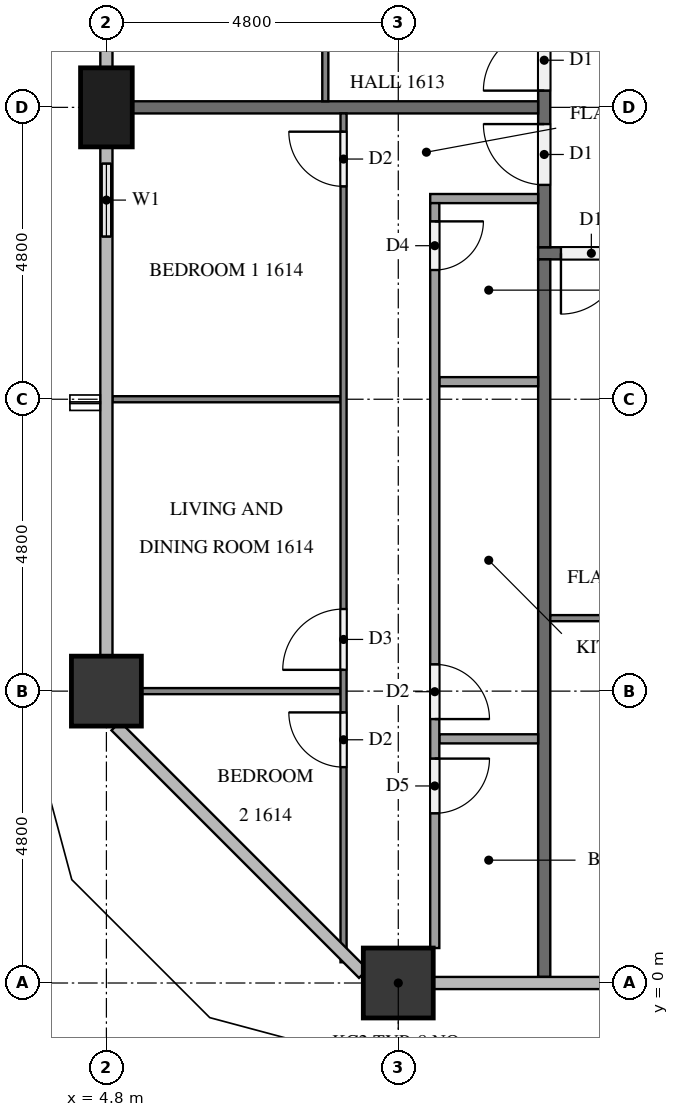
"""IFC4 building model, lengths in metres.
Left out: names, types, materials, properties, quantities, classifications, styles, units other than length and angle.
Written with IfcOpenShell. Run it as: python <this file> out.ifc"""

import sys

from ifc_helpers import new_model, si_unit, direction, frame, frame_2d, origin, origin_2d, place, context, subcontext, project, spatial, rectangle, extrude, element, fill, save


model = new_model("IFC4")
c1 = context("Model", 3, precision=1e-05, world=origin(), true_north=direction((0.0, 1.0)))
c2 = subcontext(c1, "Body", "Model", "MODEL_VIEW")
j1 = project(units=[si_unit("LENGTHUNIT", "METRE"), si_unit("PLANEANGLEUNIT", "RADIAN")], contexts=[c1])
p1 = place(None, origin())
s1 = spatial("IfcSite", under=j1, at=p1, CompositionType="ELEMENT")
p2 = place(p1, origin())
s2 = spatial("IfcBuilding", under=s1, at=p2, CompositionType="ELEMENT")
p3 = place(p2, frame((0.0, 0.0, 66.3)))
s3 = spatial("IfcBuildingStorey", under=s2, at=p3, CompositionType="ELEMENT", Elevation=66.3)
p4 = place(p3, frame((9.6, 0.0, 0.0), z_axis=(0.0, 0.0, 1.0), x_axis=(1.0, 0.0, 0.0)))
e1 = element("IfcColumn", 1, at=p4, inside=s3, PredefinedType="COLUMN", context=c2, shape_type="SweptSolid", body=[
    extrude(rectangle(XDim=1.15, YDim=1.15, at=origin_2d()), origin(), (0.0, 0.0, 1.0), 3.2),
])
p5 = place(p3, frame((4.8, 14.4, 0.0), z_axis=(0.0, 0.0, 1.0), x_axis=(0.0, 1.0, 0.0)))
e2 = element("IfcColumn", 2, at=p5, inside=s3, PredefinedType="COLUMN", context=c2, shape_type="SweptSolid", body=[
    extrude(rectangle(XDim=1.3, YDim=0.85, at=origin_2d()), origin(), (0.0, 0.0, 1.0), 3.2),
])
p6 = place(p3, frame((4.8, 4.8, 0.0), z_axis=(0.0, 0.0, 1.0), x_axis=(1.0, 0.0, 0.0)))
e3 = element("IfcColumn", 3, at=p6, inside=s3, PredefinedType="COLUMN", context=c2, shape_type="SweptSolid", body=[
    extrude(rectangle(XDim=1.15, YDim=1.15, at=origin_2d()), origin(), (0.0, 0.0, 1.0), 3.2),
])
p7 = place(p3, frame((4.8, 13.75, 0.0), z_axis=(0.0, 0.0, 1.0), x_axis=(0.0, -1.0, 0.0)))
e4 = element("IfcWall", 4, at=p7, inside=s3, PredefinedType="SOLIDWALL", context=c2, shape_type="SweptSolid", body=[
    extrude(rectangle(XDim=1.75, YDim=0.15, at=frame_2d((0.875, 0.0))), origin(), (0.0, 0.0, 1.0), 3.2),
])
p8 = place(p7, frame((0.275, 0.0, 0.9)))
e5 = element("IfcOpeningElement", 5, at=p8, cuts=e4, PredefinedType="OPENING", context=c2, shape_type="SweptSolid", body=[
    extrude(rectangle(XDim=1.2, YDim=1.4, at=frame_2d((0.6, 0.7))), frame((0.0, 0.085, 0.0), z_axis=(0.0, -1.0, 0.0), x_axis=(1.0, 0.0, 0.0)), (0.0, 0.0, 1.0), 0.17),
])
p9 = place(p3, frame((50.5, 12.0, 0.0), z_axis=(0.0, 0.0, 1.0), x_axis=(-1.0, 0.0, 0.0)))
e6 = element("IfcWall", 6, at=p9, inside=s3, PredefinedType="PARTITIONING", context=c2, shape_type="SweptSolid", body=[
    extrude(rectangle(XDim=38.6, YDim=0.2, at=frame_2d((19.3, 0.0))), origin(), (0.0, 0.0, 1.0), 3.2),
])
p10 = place(p9, frame((37.225, 0.0, 0.0)))
e7 = element("IfcOpeningElement", 7, at=p10, cuts=e6, PredefinedType="OPENING", context=c2, shape_type="SweptSolid", body=[
    extrude(rectangle(XDim=1.0, YDim=2.1, at=frame_2d((0.5, 1.05))), frame((0.0, 0.11, 0.0), z_axis=(0.0, -1.0, 0.0), x_axis=(1.0, 0.0, 0.0)), (0.0, 0.0, 1.0), 0.22),
])
p11 = place(p9, frame((22.825, 0.0, 0.0)))
e8 = element("IfcOpeningElement", 8, at=p11, cuts=e6, PredefinedType="OPENING", context=c2, shape_type="SweptSolid", body=[
    extrude(rectangle(XDim=1.0, YDim=2.1, at=frame_2d((0.5, 1.05))), frame((0.0, 0.11, 0.0), z_axis=(0.0, -1.0, 0.0), x_axis=(1.0, 0.0, 0.0)), (0.0, 0.0, 1.0), 0.22),
])
p12 = place(p9, frame((0.375, 0.0, 0.0)))
e9 = element("IfcOpeningElement", 9, at=p12, cuts=e6, PredefinedType="OPENING", context=c2, shape_type="SweptSolid", body=[
    extrude(rectangle(XDim=1.0, YDim=2.1, at=frame_2d((0.5, 1.05))), frame((0.0, 0.11, 0.0), z_axis=(0.0, -1.0, 0.0), x_axis=(1.0, 0.0, 0.0)), (0.0, 0.0, 1.0), 0.22),
])
p13 = place(p3, frame((12.0, 12.1, 0.0), z_axis=(0.0, 0.0, 1.0), x_axis=(0.0, 1.0, 0.0)))
e10 = element("IfcWall", 10, at=p13, inside=s3, PredefinedType="PARTITIONING", context=c2, shape_type="SweptSolid", body=[
    extrude(rectangle(XDim=28.6, YDim=0.2, at=frame_2d((14.3, 0.0))), origin(), (0.0, 0.0, 1.0), 3.2),
])
p14 = place(p13, frame((19.375, 0.0, 0.0)))
e11 = element("IfcOpeningElement", 11, at=p14, cuts=e10, PredefinedType="OPENING", context=c2, shape_type="SweptSolid", body=[
    extrude(rectangle(XDim=1.0, YDim=2.1, at=frame_2d((0.5, 1.05))), frame((0.0, 0.11, 0.0), z_axis=(0.0, -1.0, 0.0), x_axis=(1.0, 0.0, 0.0)), (0.0, 0.0, 1.0), 0.22),
])
p15 = place(p13, frame((12.175, 0.0, 0.0)))
e12 = element("IfcOpeningElement", 12, at=p15, cuts=e10, PredefinedType="OPENING", context=c2, shape_type="SweptSolid", body=[
    extrude(rectangle(XDim=1.0, YDim=2.1, at=frame_2d((0.5, 1.05))), frame((0.0, 0.11, 0.0), z_axis=(0.0, -1.0, 0.0), x_axis=(1.0, 0.0, 0.0)), (0.0, 0.0, 1.0), 0.22),
])
p16 = place(p13, frame((2.575, 0.0, 0.0)))
e13 = element("IfcOpeningElement", 13, at=p16, cuts=e10, PredefinedType="OPENING", context=c2, shape_type="SweptSolid", body=[
    extrude(rectangle(XDim=1.0, YDim=2.1, at=frame_2d((0.5, 1.05))), frame((0.0, 0.11, 0.0), z_axis=(0.0, -1.0, 0.0), x_axis=(1.0, 0.0, 0.0)), (0.0, 0.0, 1.0), 0.22),
])
p17 = place(p13, frame((1.025, 0.0, 0.0)))
e14 = element("IfcOpeningElement", 14, at=p17, cuts=e10, PredefinedType="OPENING", context=c2, shape_type="SweptSolid", body=[
    extrude(rectangle(XDim=1.0, YDim=2.1, at=frame_2d((0.5, 1.05))), frame((0.0, 0.11, 0.0), z_axis=(0.0, -1.0, 0.0), x_axis=(1.0, 0.0, 0.0)), (0.0, 0.0, 1.0), 0.22),
])
p18 = place(p3, frame((12.0, 0.1, 0.0), z_axis=(0.0, 0.0, 1.0), x_axis=(0.0, 1.0, 0.0)))
e15 = element("IfcWall", 15, at=p18, inside=s3, PredefinedType="PARTITIONING", context=c2, shape_type="SweptSolid", body=[
    extrude(rectangle(XDim=11.8, YDim=0.2, at=frame_2d((5.9, 0.0))), origin(), (0.0, 0.0, 1.0), 3.2),
])
p19 = place(p3, frame((5.225, 14.4, 0.0), z_axis=(0.0, 0.0, 1.0), x_axis=(1.0, 0.0, 0.0)))
e16 = element("IfcWall", 16, at=p19, inside=s3, PredefinedType="PARTITIONING", context=c2, shape_type="SweptSolid", body=[
    extrude(rectangle(XDim=6.675, YDim=0.2, at=frame_2d((3.337, 0.0))), origin(), (0.0, 0.0, 1.0), 3.2),
])
p20 = place(p3, frame((26.3, 6.0, 0.0), z_axis=(0.0, 0.0, 1.0), x_axis=(-1.0, 0.0, 0.0)))
e17 = element("IfcWall", 17, at=p20, inside=s3, PredefinedType="PARTITIONING", context=c2, shape_type="SweptSolid", body=[
    extrude(rectangle(XDim=14.2, YDim=0.1, at=frame_2d((7.1, 0.0))), origin(), (0.0, 0.0, 1.0), 3.2),
])
p21 = place(p20, frame((9.85, 0.0, 0.0)))
e18 = element("IfcOpeningElement", 18, at=p21, cuts=e17, PredefinedType="OPENING", context=c2, shape_type="SweptSolid", body=[
    extrude(rectangle(XDim=0.9, YDim=2.1, at=frame_2d((0.45, 1.05))), frame((0.0, 0.06, 0.0), z_axis=(0.0, -1.0, 0.0), x_axis=(1.0, 0.0, 0.0)), (0.0, 0.0, 1.0), 0.12),
])
p22 = place(p20, frame((8.15, 0.0, 0.0)))
e19 = element("IfcOpeningElement", 19, at=p22, cuts=e17, PredefinedType="OPENING", context=c2, shape_type="SweptSolid", body=[
    extrude(rectangle(XDim=1.0, YDim=2.1, at=frame_2d((0.5, 1.05))), frame((0.0, 0.06, 0.0), z_axis=(0.0, -1.0, 0.0), x_axis=(1.0, 0.0, 0.0)), (0.0, 0.0, 1.0), 0.12),
])
p23 = place(p20, frame((0.3, 0.0, 0.0)))
e20 = element("IfcOpeningElement", 20, at=p23, cuts=e17, PredefinedType="OPENING", context=c2, shape_type="SweptSolid", body=[
    extrude(rectangle(XDim=0.9, YDim=2.1, at=frame_2d((0.45, 1.05))), frame((0.0, 0.06, 0.0), z_axis=(0.0, -1.0, 0.0), x_axis=(1.0, 0.0, 0.0)), (0.0, 0.0, 1.0), 0.12),
])
p24 = place(p3, frame((8.4, 14.5, 0.0), z_axis=(0.0, 0.0, 1.0), x_axis=(0.0, 1.0, 0.0)))
e21 = element("IfcWall", 21, at=p24, inside=s3, PredefinedType="PARTITIONING", context=c2, shape_type="SweptSolid", body=[
    extrude(rectangle(XDim=9.4, YDim=0.1, at=frame_2d((4.7, 0.0))), origin(), (0.0, 0.0, 1.0), 3.2),
])
p25 = place(p24, frame((3.35, 0.0, 0.0)))
e22 = element("IfcOpeningElement", 22, at=p25, cuts=e21, PredefinedType="OPENING", context=c2, shape_type="SweptSolid", body=[
    extrude(rectangle(XDim=1.0, YDim=2.1, at=frame_2d((0.5, 1.05))), frame((0.0, 0.06, 0.0), z_axis=(0.0, -1.0, 0.0), x_axis=(1.0, 0.0, 0.0)), (0.0, 0.0, 1.0), 0.12),
])
p26 = place(p24, frame((5.05, 0.0, 0.0)))
e23 = element("IfcOpeningElement", 23, at=p26, cuts=e21, PredefinedType="OPENING", context=c2, shape_type="SweptSolid", body=[
    extrude(rectangle(XDim=0.9, YDim=2.1, at=frame_2d((0.45, 1.05))), frame((0.0, 0.06, 0.0), z_axis=(0.0, -1.0, 0.0), x_axis=(1.0, 0.0, 0.0)), (0.0, 0.0, 1.0), 0.12),
])
p27 = place(p3, frame((8.65, 9.6, 0.0), z_axis=(0.0, 0.0, 1.0), x_axis=(-1.0, 0.0, 0.0)))
e24 = element("IfcWall", 24, at=p27, inside=s3, PredefinedType="PARTITIONING", context=c2, shape_type="SweptSolid", body=[
    extrude(rectangle(XDim=3.75, YDim=0.1, at=frame_2d((1.875, 0.0))), origin(), (0.0, 0.0, 1.0), 3.2),
])
p28 = place(p3, frame((8.65, 4.8, 0.0), z_axis=(0.0, 0.0, 1.0), x_axis=(-1.0, 0.0, 0.0)))
e25 = element("IfcWall", 25, at=p28, inside=s3, PredefinedType="PARTITIONING", context=c2, shape_type="SweptSolid", body=[
    extrude(rectangle(XDim=3.275, YDim=0.1, at=frame_2d((1.637, 0.0))), origin(), (0.0, 0.0, 1.0), 3.2),
])
p29 = place(p3, frame((8.7, 0.341, 0.0), z_axis=(0.0, 0.0, 1.0), x_axis=(0.0, 1.0, 0.0)))
e26 = element("IfcWall", 26, at=p29, inside=s3, PredefinedType="PARTITIONING", context=c2, shape_type="SweptSolid", body=[
    extrude(rectangle(XDim=13.959, YDim=0.1, at=frame_2d((6.979, 0.0))), origin(), (0.0, 0.0, 1.0), 3.2),
])
p30 = place(p29, frame((12.759, 0.0, 0.0)))
e27 = element("IfcOpeningElement", 27, at=p30, cuts=e26, PredefinedType="OPENING", context=c2, shape_type="SweptSolid", body=[
    extrude(rectangle(XDim=0.9, YDim=2.1, at=frame_2d((0.45, 1.05))), frame((0.0, 0.06, 0.0), z_axis=(0.0, -1.0, 0.0), x_axis=(1.0, 0.0, 0.0)), (0.0, 0.0, 1.0), 0.12),
])
p31 = place(p29, frame((4.809, 0.0, 0.0)))
e28 = element("IfcOpeningElement", 28, at=p31, cuts=e26, PredefinedType="OPENING", context=c2, shape_type="SweptSolid", body=[
    extrude(rectangle(XDim=1.0, YDim=2.1, at=frame_2d((0.5, 1.05))), frame((0.0, 0.06, 0.0), z_axis=(0.0, -1.0, 0.0), x_axis=(1.0, 0.0, 0.0)), (0.0, 0.0, 1.0), 0.12),
])
p32 = place(p29, frame((3.209, 0.0, 0.0)))
e29 = element("IfcOpeningElement", 29, at=p32, cuts=e26, PredefinedType="OPENING", context=c2, shape_type="SweptSolid", body=[
    extrude(rectangle(XDim=0.9, YDim=2.1, at=frame_2d((0.45, 1.05))), frame((0.0, 0.06, 0.0), z_axis=(0.0, -1.0, 0.0), x_axis=(1.0, 0.0, 0.0)), (0.0, 0.0, 1.0), 0.12),
])
for number, where, z_axis, x_axis in (
    (30, (11.9, 9.888, 0.0), (0.0, 0.0, 1.0), (-1.0, 0.0, 0.0)),
    (31, (11.9, 4.015, 0.0), (0.0, 0.0, 1.0), (-1.0, 0.0, 0.0)),
):
    element("IfcWall", number, at=place(p3, frame(where, z_axis=z_axis, x_axis=x_axis)), inside=s3, PredefinedType="PARTITIONING", context=c2, shape_type="SweptSolid", body=[
        extrude(rectangle(XDim=1.625, YDim=0.15, at=frame_2d((0.812, 0.0))), origin(), (0.0, 0.0, 1.0), 3.2),
    ])
p33 = place(p3, frame((11.9, 12.9, 0.0), z_axis=(0.0, 0.0, 1.0), x_axis=(-1.0, 0.0, 0.0)))
e32 = element("IfcWall", 32, at=p33, inside=s3, PredefinedType="PARTITIONING", context=c2, shape_type="SweptSolid", body=[
    extrude(rectangle(XDim=1.775, YDim=0.15, at=frame_2d((0.887, 0.0))), origin(), (0.0, 0.0, 1.0), 3.2),
])
p34 = place(p3, frame((10.2, 12.825, 0.0), z_axis=(0.0, 0.0, 1.0), x_axis=(0.0, -1.0, 0.0)))
e33 = element("IfcWall", 33, at=p34, inside=s3, PredefinedType="PARTITIONING", context=c2, shape_type="SweptSolid", body=[
    extrude(rectangle(XDim=12.25, YDim=0.15, at=frame_2d((6.125, 0.0))), origin(), (0.0, 0.0, 1.0), 3.2),
])
p35 = place(p34, frame((0.3, 0.0, 0.0)))
e34 = element("IfcOpeningElement", 34, at=p35, cuts=e33, PredefinedType="OPENING", context=c2, shape_type="SweptSolid", body=[
    extrude(rectangle(XDim=0.8, YDim=2.1, at=frame_2d((0.4, 1.05))), frame((0.0, 0.085, 0.0), z_axis=(0.0, -1.0, 0.0), x_axis=(1.0, 0.0, 0.0)), (0.0, 0.0, 1.0), 0.17),
])
p36 = place(p34, frame((7.585, 0.0, 0.0)))
e35 = element("IfcOpeningElement", 35, at=p36, cuts=e33, PredefinedType="OPENING", context=c2, shape_type="SweptSolid", body=[
    extrude(rectangle(XDim=0.9, YDim=2.1, at=frame_2d((0.45, 1.05))), frame((0.0, 0.085, 0.0), z_axis=(0.0, -1.0, 0.0), x_axis=(1.0, 0.0, 0.0)), (0.0, 0.0, 1.0), 0.17),
])
p37 = place(p34, frame((9.135, 0.0, 0.0)))
e36 = element("IfcOpeningElement", 36, at=p37, cuts=e33, PredefinedType="OPENING", context=c2, shape_type="SweptSolid", body=[
    extrude(rectangle(XDim=0.9, YDim=2.1, at=frame_2d((0.45, 1.05))), frame((0.0, 0.085, 0.0), z_axis=(0.0, -1.0, 0.0), x_axis=(1.0, 0.0, 0.0)), (0.0, 0.0, 1.0), 0.17),
])
p38 = place(p8, origin())
e37 = element("IfcWindow", 37, at=p38, inside=s3, PartitioningType="SINGLE_PANEL", PredefinedType="WINDOW", context=c2, shape_type="SweptSolid", body=[
    extrude(rectangle(XDim=1.2, YDim=1.4, at=frame_2d((0.6, 0.7))), frame((0.0, 0.03, 0.0), z_axis=(0.0, -1.0, 0.0), x_axis=(1.0, 0.0, 0.0)), (0.0, 0.0, 1.0), 0.06),
])
fill(e5, e37)
p39 = place(p10, origin())
e38 = element("IfcDoor", 38, at=p39, inside=s3, OperationType="SINGLE_SWING_RIGHT", PredefinedType="DOOR", context=c2, shape_type="SweptSolid", body=[
    extrude(rectangle(XDim=1.0, YDim=2.1, at=frame_2d((0.5, 1.05))), frame((0.0, 0.025, 0.0), z_axis=(0.0, -1.0, 0.0), x_axis=(1.0, 0.0, 0.0)), (0.0, 0.0, 1.0), 0.05),
])
fill(e7, e38)
p40 = place(p16, origin())
e39 = element("IfcDoor", 39, at=p40, inside=s3, OperationType="SINGLE_SWING_LEFT", PredefinedType="DOOR", context=c2, shape_type="SweptSolid", body=[
    extrude(rectangle(XDim=1.0, YDim=2.1, at=frame_2d((0.5, 1.05))), frame((0.0, 0.025, 0.0), z_axis=(0.0, -1.0, 0.0), x_axis=(1.0, 0.0, 0.0)), (0.0, 0.0, 1.0), 0.05),
])
fill(e13, e39)
p41 = place(p17, origin())
e40 = element("IfcDoor", 40, at=p41, inside=s3, OperationType="SINGLE_SWING_RIGHT", PredefinedType="DOOR", context=c2, shape_type="SweptSolid", body=[
    extrude(rectangle(XDim=1.0, YDim=2.1, at=frame_2d((0.5, 1.05))), frame((0.0, 0.025, 0.0), z_axis=(0.0, -1.0, 0.0), x_axis=(1.0, 0.0, 0.0)), (0.0, 0.0, 1.0), 0.05),
])
fill(e14, e40)
p42 = place(p30, origin())
e41 = element("IfcDoor", 41, at=p42, inside=s3, OperationType="SINGLE_SWING_RIGHT", PredefinedType="DOOR", context=c2, shape_type="SweptSolid", body=[
    extrude(rectangle(XDim=0.9, YDim=2.1, at=frame_2d((0.45, 1.05))), frame((0.0, 0.025, 0.0), z_axis=(0.0, -1.0, 0.0), x_axis=(1.0, 0.0, 0.0)), (0.0, 0.0, 1.0), 0.05),
])
fill(e27, e41)
p43 = place(p31, origin())
e42 = element("IfcDoor", 42, at=p43, inside=s3, OperationType="SINGLE_SWING_LEFT", PredefinedType="DOOR", context=c2, shape_type="SweptSolid", body=[
    extrude(rectangle(XDim=1.0, YDim=2.1, at=frame_2d((0.5, 1.05))), frame((0.0, 0.025, 0.0), z_axis=(0.0, -1.0, 0.0), x_axis=(1.0, 0.0, 0.0)), (0.0, 0.0, 1.0), 0.05),
])
fill(e28, e42)
p44 = place(p32, origin())
e43 = element("IfcDoor", 43, at=p44, inside=s3, OperationType="SINGLE_SWING_RIGHT", PredefinedType="DOOR", context=c2, shape_type="SweptSolid", body=[
    extrude(rectangle(XDim=0.9, YDim=2.1, at=frame_2d((0.45, 1.05))), frame((0.0, 0.025, 0.0), z_axis=(0.0, -1.0, 0.0), x_axis=(1.0, 0.0, 0.0)), (0.0, 0.0, 1.0), 0.05),
])
fill(e29, e43)
p45 = place(p35, origin())
e44 = element("IfcDoor", 44, at=p45, inside=s3, OperationType="SINGLE_SWING_LEFT", PredefinedType="DOOR", context=c2, shape_type="SweptSolid", body=[
    extrude(rectangle(XDim=0.8, YDim=2.1, at=frame_2d((0.4, 1.05))), frame((0.0, 0.025, 0.0), z_axis=(0.0, -1.0, 0.0), x_axis=(1.0, 0.0, 0.0)), (0.0, 0.0, 1.0), 0.05),
])
fill(e34, e44)
p46 = place(p36, origin())
e45 = element("IfcDoor", 45, at=p46, inside=s3, OperationType="SINGLE_SWING_RIGHT", PredefinedType="DOOR", context=c2, shape_type="SweptSolid", body=[
    extrude(rectangle(XDim=0.9, YDim=2.1, at=frame_2d((0.45, 1.05))), frame((0.0, 0.025, 0.0), z_axis=(0.0, -1.0, 0.0), x_axis=(1.0, 0.0, 0.0)), (0.0, 0.0, 1.0), 0.05),
])
fill(e35, e45)
p47 = place(p37, origin())
e46 = element("IfcDoor", 46, at=p47, inside=s3, OperationType="SINGLE_SWING_LEFT", PredefinedType="DOOR", context=c2, shape_type="SweptSolid", body=[
    extrude(rectangle(XDim=0.9, YDim=2.1, at=frame_2d((0.45, 1.05))), frame((0.0, 0.025, 0.0), z_axis=(0.0, -1.0, 0.0), x_axis=(1.0, 0.0, 0.0)), (0.0, 0.0, 1.0), 0.05),
])
fill(e36, e46)
save(model, sys.argv[1])
